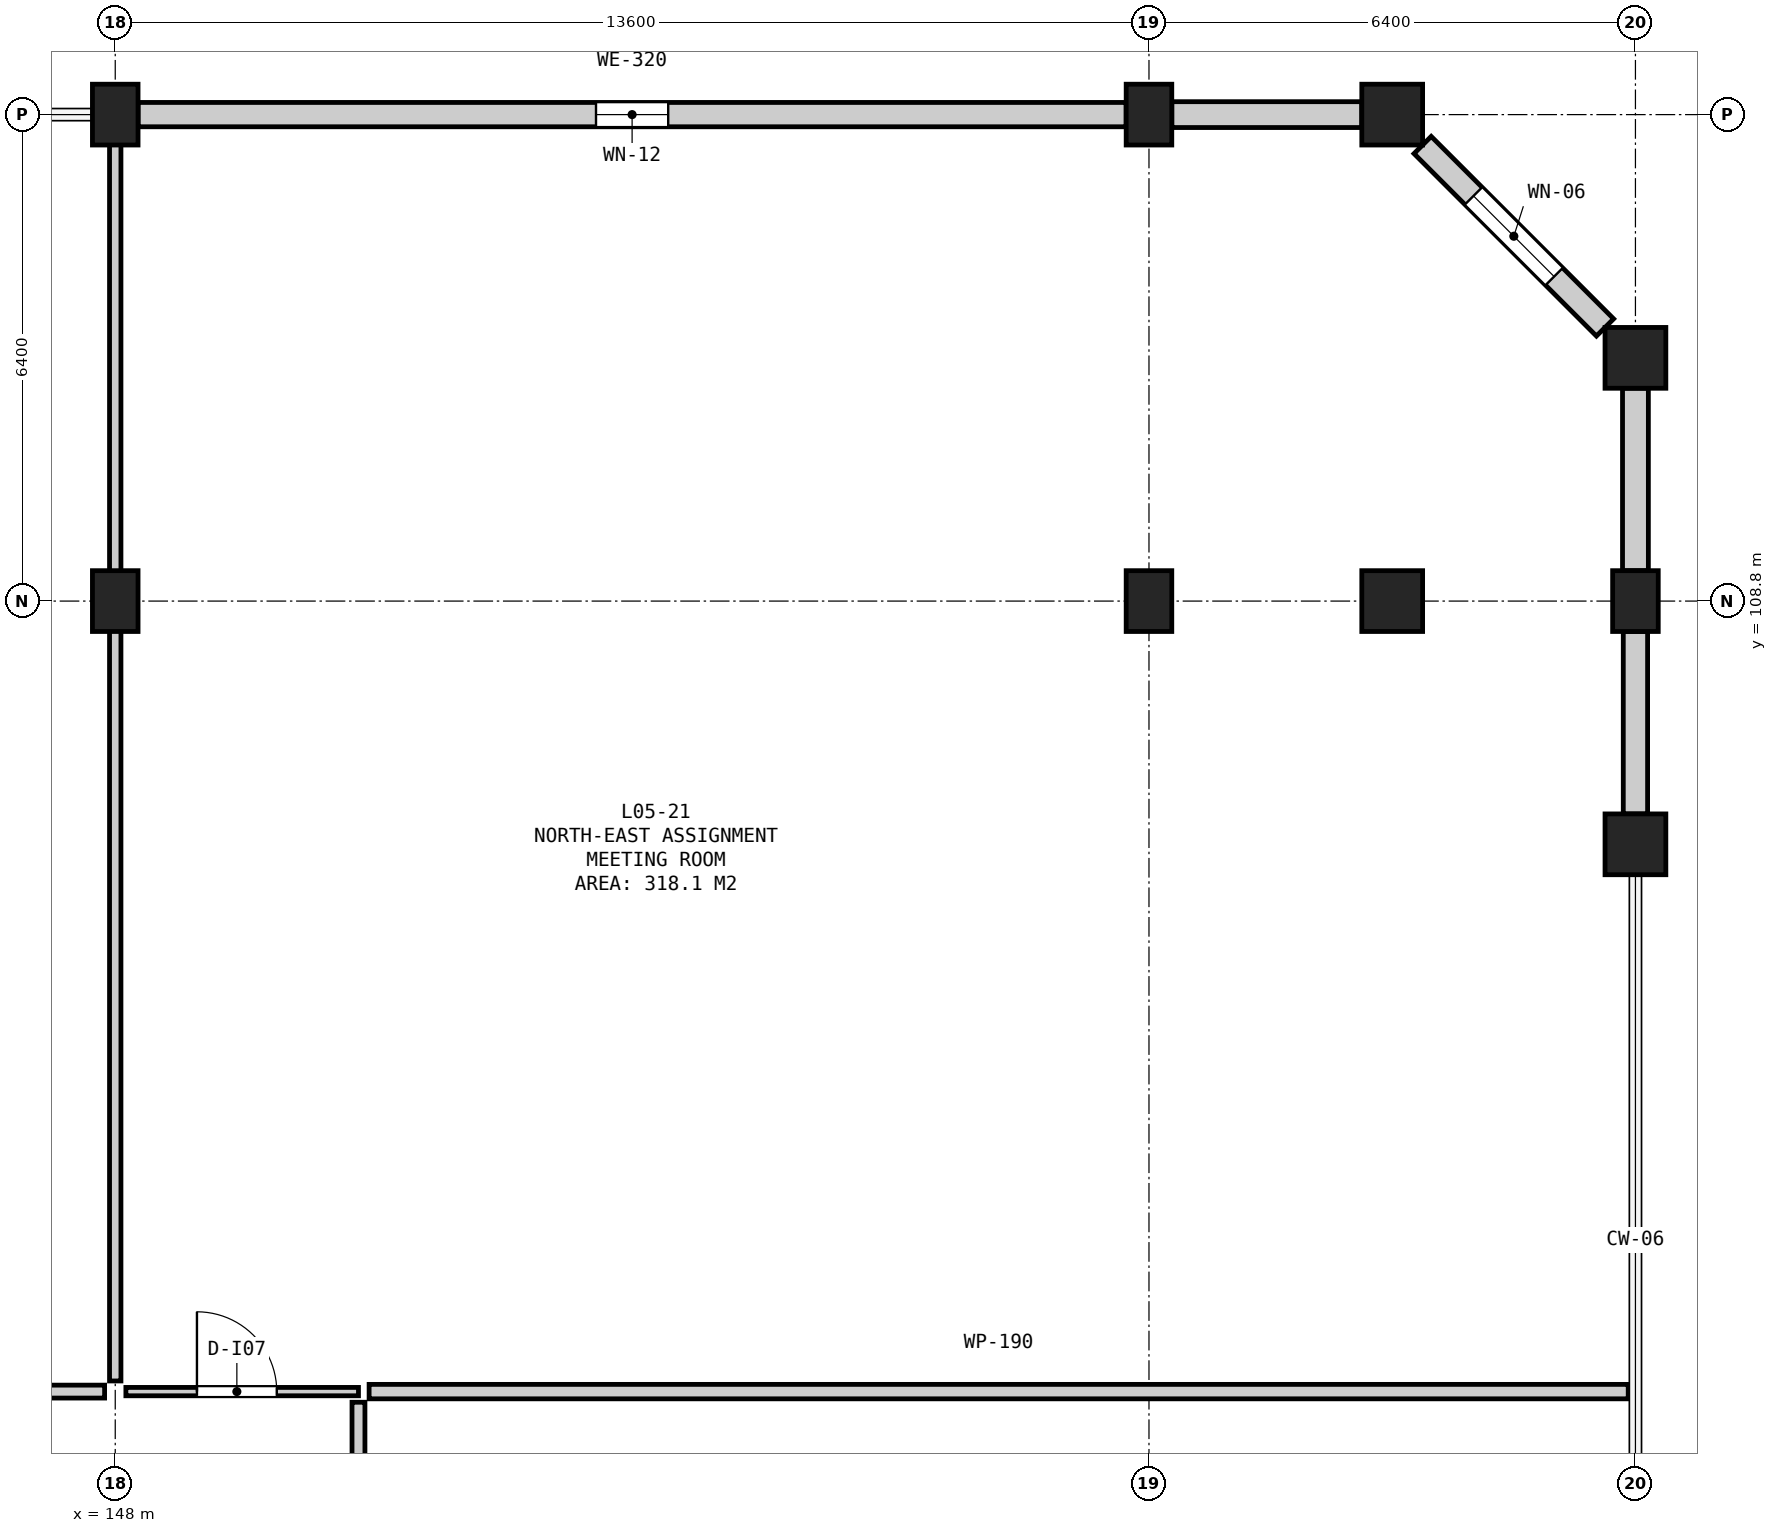
"""IFC4 building model, lengths in metres.
Left out: names, types, materials, properties, quantities, classifications, styles, units other than length and angle.
Written with IfcOpenShell. Run it as: python <this file> out.ifc"""

import sys

from ifc_helpers import new_model, si_unit, direction, frame, frame_2d, origin, origin_2d, place, context, subcontext, project, spatial, rectangle, circle, extrude, element, fill, save


model = new_model("IFC4")
c1 = context("Model", 3, precision=1e-05, world=origin(), true_north=direction((0.0, 1.0)))
c2 = subcontext(c1, "Body", "Model", "MODEL_VIEW")
j1 = project(units=[si_unit("LENGTHUNIT", "METRE"), si_unit("PLANEANGLEUNIT", "RADIAN")], contexts=[c1])
p1 = place(None, origin())
s1 = spatial("IfcSite", under=j1, at=p1, CompositionType="ELEMENT")
p2 = place(p1, origin())
s2 = spatial("IfcBuilding", under=s1, at=p2, CompositionType="ELEMENT")
p3 = place(p2, frame((0.0, 0.0, 23.8)))
s3 = spatial("IfcBuildingStorey", under=s2, at=p3, CompositionType="ELEMENT", Elevation=23.8)
for number, where, z_axis, x_axis in (
    (1, (148.0, 108.8, 0.0), (0.0, 0.0, 1.0), (1.0, 0.0, 0.0)),
    (2, (148.0, 115.2, 0.0), (0.0, 0.0, 1.0), (1.0, 0.0, 0.0)),
    (3, (161.6, 108.8, 0.0), (0.0, 0.0, 1.0), (1.0, 0.0, 0.0)),
    (4, (161.6, 115.2, 0.0), (0.0, 0.0, 1.0), (1.0, 0.0, 0.0)),
):
    element("IfcColumn", number, at=place(p3, frame(where, z_axis=z_axis, x_axis=x_axis)), inside=s3, PredefinedType="COLUMN", context=c2, shape_type="SweptSolid", body=[
        extrude(rectangle(XDim=0.6, YDim=0.8, at=origin_2d()), origin(), (0.0, 0.0, 1.0), 4.0),
    ])
for number, where, z_axis, x_axis in (
    (5, (164.8, 108.8, 0.0), (0.0, 0.0, 1.0), (1.0, 0.0, 0.0)),
    (6, (164.8, 115.2, 0.0), (0.0, 0.0, 1.0), (1.0, 0.0, 0.0)),
    (7, (168.0, 105.6, 0.0), (0.0, 0.0, 1.0), (1.0, 0.0, 0.0)),
):
    element("IfcColumn", number, at=place(p3, frame(where, z_axis=z_axis, x_axis=x_axis)), inside=s3, PredefinedType="COLUMN", context=c2, shape_type="SweptSolid", body=[
        extrude(circle(Radius=0.4, at=origin_2d()), origin(), (0.0, 0.0, 1.0), 4.0),
    ])
p4 = place(p3, frame((168.0, 108.8, 0.0), z_axis=(0.0, 0.0, 1.0), x_axis=(1.0, 0.0, 0.0)))
e8 = element("IfcColumn", 8, at=p4, inside=s3, PredefinedType="COLUMN", context=c2, shape_type="SweptSolid", body=[
    extrude(rectangle(XDim=0.6, YDim=0.8, at=origin_2d()), origin(), (0.0, 0.0, 1.0), 4.0),
])
p5 = place(p3, frame((168.0, 112.0, 0.0), z_axis=(0.0, 0.0, 1.0), x_axis=(1.0, 0.0, 0.0)))
e9 = element("IfcColumn", 9, at=p5, inside=s3, PredefinedType="COLUMN", context=c2, shape_type="SweptSolid", body=[
    extrude(circle(Radius=0.4, at=origin_2d()), origin(), (0.0, 0.0, 1.0), 4.0),
])
p6 = place(p3, frame((168.0, 106.0, 0.0), z_axis=(0.0, 0.0, 1.0), x_axis=(0.0, 1.0, 0.0)))
e10 = element("IfcWall", 10, at=p6, inside=s3, PredefinedType="SOLIDWALL", context=c2, shape_type="SweptSolid", body=[
    extrude(rectangle(XDim=2.4, YDim=0.32, at=frame_2d((1.2, 0.0))), origin(), (0.0, 0.0, 1.0), 3.085),
])
p7 = place(p3, frame((168.0, 109.2, 0.0), z_axis=(0.0, 0.0, 1.0), x_axis=(0.0, 1.0, 0.0)))
e11 = element("IfcWall", 11, at=p7, inside=s3, PredefinedType="SOLIDWALL", context=c2, shape_type="SweptSolid", body=[
    extrude(rectangle(XDim=2.4, YDim=0.34, at=frame_2d((1.2, 0.0))), origin(), (0.0, 0.0, 1.0), 3.1),
])
p8 = place(p3, frame((167.6, 112.4, 0.0), z_axis=(0.0, 0.0, 1.0), x_axis=(-0.707106781187, 0.707106781187, 0.0)))
e12 = element("IfcWall", 12, at=p8, inside=s3, PredefinedType="SOLIDWALL", context=c2, shape_type="SweptSolid", body=[
    extrude(rectangle(XDim=3.394, YDim=0.32, at=frame_2d((1.697, 0.0))), origin(), (0.0, 0.0, 1.0), 3.095),
])
p9 = place(p8, frame((0.947, 0.0, 0.9)))
e13 = element("IfcOpeningElement", 13, at=p9, cuts=e12, PredefinedType="OPENING", context=c2, shape_type="SweptSolid", body=[
    extrude(rectangle(XDim=1.5, YDim=1.85, at=frame_2d((0.75, 0.925))), frame((0.0, 0.172, 0.0), z_axis=(0.0, -1.0, 0.0), x_axis=(1.0, 0.0, 0.0)), (0.0, 0.0, 1.0), 0.344),
])
p10 = place(p3, frame((164.4, 115.2, 0.0), z_axis=(0.0, 0.0, 1.0), x_axis=(-1.0, 0.0, 0.0)))
e14 = element("IfcWall", 14, at=p10, inside=s3, PredefinedType="SOLIDWALL", context=c2, shape_type="SweptSolid", body=[
    extrude(rectangle(XDim=2.5, YDim=0.34, at=frame_2d((1.25, 0.0))), origin(), (0.0, 0.0, 1.0), 3.1),
])
p11 = place(p3, frame((161.3, 115.2, 0.0), z_axis=(0.0, 0.0, 1.0), x_axis=(-1.0, 0.0, 0.0)))
e15 = element("IfcWall", 15, at=p11, inside=s3, PredefinedType="SOLIDWALL", context=c2, shape_type="SweptSolid", body=[
    extrude(rectangle(XDim=13.0, YDim=0.32, at=frame_2d((6.5, 0.0))), origin(), (0.0, 0.0, 1.0), 2.685),
])
p12 = place(p11, frame((6.025, 0.0, 0.8)))
e16 = element("IfcOpeningElement", 16, at=p12, cuts=e15, PredefinedType="OPENING", context=c2, shape_type="SweptSolid", body=[
    extrude(rectangle(XDim=0.95, YDim=1.45, at=frame_2d((0.475, 0.725))), frame((0.0, 0.172, 0.0), z_axis=(0.0, -1.0, 0.0), x_axis=(1.0, 0.0, 0.0)), (0.0, 0.0, 1.0), 0.344),
])
p13 = place(p3, frame((151.34, 98.4, 0.0), z_axis=(0.0, 0.0, 1.0), x_axis=(1.0, 0.0, 0.0)))
e17 = element("IfcWall", 17, at=p13, inside=s3, PredefinedType="PARTITIONING", context=c2, shape_type="SweptSolid", body=[
    extrude(rectangle(XDim=16.565, YDim=0.19, at=frame_2d((8.282, 0.0))), origin(), (0.0, 0.0, 1.0), 3.72),
])
p14 = place(p3, frame((151.2, 86.54, 0.0), z_axis=(0.0, 0.0, 1.0), x_axis=(0.0, 1.0, 0.0)))
e18 = element("IfcWall", 18, at=p14, inside=s3, PredefinedType="PARTITIONING", context=c2, shape_type="SweptSolid", body=[
    extrude(rectangle(XDim=11.72, YDim=0.17, at=frame_2d((5.86, 0.0))), origin(), (0.0, 0.0, 1.0), 3.72),
])
p15 = place(p14, frame((4.435, 0.0, 0.0)))
e19 = element("IfcOpeningElement", 19, at=p15, cuts=e18, PredefinedType="OPENING", context=c2, shape_type="SweptSolid", body=[
    extrude(rectangle(XDim=1.05, YDim=2.15, at=frame_2d((0.525, 1.075))), frame((0.0, 0.097, 0.0), z_axis=(0.0, -1.0, 0.0), x_axis=(1.0, 0.0, 0.0)), (0.0, 0.0, 1.0), 0.194),
])
p16 = place(p3, frame((128.14, 98.4, 0.0), z_axis=(0.0, 0.0, 1.0), x_axis=(1.0, 0.0, 0.0)))
e20 = element("IfcWall", 20, at=p16, inside=s3, PredefinedType="PARTITIONING", context=c2, shape_type="SweptSolid", body=[
    extrude(rectangle(XDim=19.72, YDim=0.17, at=frame_2d((9.86, 0.0))), origin(), (0.0, 0.0, 1.0), 3.72),
])
p17 = place(p16, frame((7.335, 0.0, 0.0)))
e21 = element("IfcOpeningElement", 21, at=p17, cuts=e20, PredefinedType="OPENING", context=c2, shape_type="SweptSolid", body=[
    extrude(rectangle(XDim=1.05, YDim=2.15, at=frame_2d((0.525, 1.075))), frame((0.0, 0.097, 0.0), z_axis=(0.0, -1.0, 0.0), x_axis=(1.0, 0.0, 0.0)), (0.0, 0.0, 1.0), 0.194),
])
p18 = place(p3, frame((148.0, 98.54, 0.0), z_axis=(0.0, 0.0, 1.0), x_axis=(0.0, 1.0, 0.0)))
e22 = element("IfcWall", 22, at=p18, inside=s3, PredefinedType="PARTITIONING", context=c2, shape_type="SweptSolid", body=[
    extrude(rectangle(XDim=16.485, YDim=0.15, at=frame_2d((8.242, 0.0))), origin(), (0.0, 0.0, 1.0), 2.645),
])
p19 = place(p3, frame((148.14, 98.4, 0.0), z_axis=(0.0, 0.0, 1.0), x_axis=(1.0, 0.0, 0.0)))
e23 = element("IfcWall", 23, at=p19, inside=s3, PredefinedType="PARTITIONING", context=c2, shape_type="SweptSolid", body=[
    extrude(rectangle(XDim=3.06, YDim=0.11, at=frame_2d((1.53, 0.0))), origin(), (0.0, 0.0, 1.0), 3.72),
])
p20 = place(p19, frame((0.935, 0.0, 0.0)))
e24 = element("IfcOpeningElement", 24, at=p20, cuts=e23, PredefinedType="OPENING", context=c2, shape_type="SweptSolid", body=[
    extrude(rectangle(XDim=1.05, YDim=2.15, at=frame_2d((0.525, 1.075))), frame((0.0, 0.067, 0.0), z_axis=(0.0, -1.0, 0.0), x_axis=(1.0, 0.0, 0.0)), (0.0, 0.0, 1.0), 0.134),
])
p21 = place(p9, origin())
e25 = element("IfcWindow", 25, at=p21, inside=s3, PartitioningType="SINGLE_PANEL", PredefinedType="WINDOW", context=c2, shape_type="SweptSolid", body=[
    extrude(rectangle(XDim=1.5, YDim=1.85, at=frame_2d((0.75, 0.925))), frame((0.0, 0.03, 0.0), z_axis=(0.0, -1.0, 0.0), x_axis=(1.0, 0.0, 0.0)), (0.0, 0.0, 1.0), 0.06),
])
fill(e13, e25)
p22 = place(p12, origin())
e26 = element("IfcWindow", 26, at=p22, inside=s3, PartitioningType="SINGLE_PANEL", PredefinedType="WINDOW", context=c2, shape_type="SweptSolid", body=[
    extrude(rectangle(XDim=0.95, YDim=1.45, at=frame_2d((0.475, 0.725))), frame((0.0, 0.03, 0.0), z_axis=(0.0, -1.0, 0.0), x_axis=(1.0, 0.0, 0.0)), (0.0, 0.0, 1.0), 0.06),
])
fill(e16, e26)
p23 = place(p20, origin())
e27 = element("IfcDoor", 27, at=p23, inside=s3, OperationType="SINGLE_SWING_LEFT", PredefinedType="DOOR", context=c2, shape_type="SweptSolid", body=[
    extrude(rectangle(XDim=1.05, YDim=2.15, at=frame_2d((0.525, 1.075))), frame((0.0, 0.025, 0.0), z_axis=(0.0, -1.0, 0.0), x_axis=(1.0, 0.0, 0.0)), (0.0, 0.0, 1.0), 0.05),
])
fill(e24, e27)
save(model, sys.argv[1])
